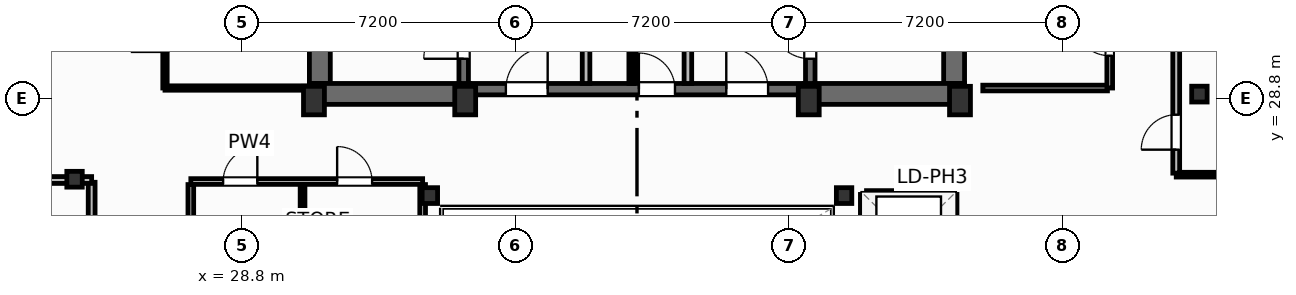
"""IFC4 building model, lengths in metres.
Left out: names, types, materials, properties, quantities, classifications, styles, units other than length and angle.
Written with IfcOpenShell. Run it as: python <this file> out.ifc"""

import sys

from ifc_helpers import new_model, si_unit, direction, frame, frame_2d, origin, origin_2d, place, context, subcontext, project, spatial, rectangle, i_section, extrude, element, fill, save


model = new_model("IFC4")
c1 = context("Model", 3, precision=1e-05, world=origin(), true_north=direction((0.0, 1.0)))
c2 = subcontext(c1, "Body", "Model", "MODEL_VIEW")
j1 = project(units=[si_unit("LENGTHUNIT", "METRE"), si_unit("PLANEANGLEUNIT", "RADIAN")], contexts=[c1])
p1 = place(None, origin())
s1 = spatial("IfcSite", under=j1, at=p1, CompositionType="ELEMENT")
p2 = place(p1, origin())
s2 = spatial("IfcBuilding", under=s1, at=p2, CompositionType="ELEMENT")
p3 = place(p2, frame((0.0, 0.0, 273.0)))
s3 = spatial("IfcBuildingStorey", under=s2, at=p3, CompositionType="ELEMENT", Elevation=273.0)
for number, where, z_axis, x_axis in (
    (1, (30.7, 28.75, 0.0), (0.0, 0.0, 1.0), (1.0, 0.0, 0.0)),
    (2, (34.68, 28.75, 0.0), (0.0, 0.0, 1.0), (1.0, 0.0, 0.0)),
    (3, (43.72, 28.75, 0.0), (0.0, 0.0, 1.0), (1.0, 0.0, 0.0)),
    (4, (47.7, 28.75, 0.0), (0.0, 0.0, 1.0), (1.0, 0.0, 0.0)),
):
    element("IfcColumn", number, at=place(p3, frame(where, z_axis=z_axis, x_axis=x_axis)), inside=s3, PredefinedType="COLUMN", context=c2, shape_type="SweptSolid", body=[
        extrude(rectangle(XDim=0.55, YDim=0.75, at=origin_2d()), origin(), (0.0, 0.0, 1.0), 3.7),
    ])
for number, where, z_axis, x_axis in (
    (5, (33.75, 26.25, 0.0), (0.0, 0.0, 1.0), (1.0, 0.0, 0.0)),
    (6, (44.65, 26.25, 0.0), (0.0, 0.0, 1.0), (1.0, 0.0, 0.0)),
    (7, (24.4, 26.68, 0.0), (0.0, 0.0, 1.0), (1.0, 0.0, 0.0)),
    (8, (54.0, 28.92, 0.0), (0.0, 0.0, 1.0), (1.0, 0.0, 0.0)),
):
    element("IfcColumn", number, at=place(p3, frame(where, z_axis=z_axis, x_axis=x_axis)), inside=s3, PredefinedType="COLUMN", context=c2, shape_type="SweptSolid", body=[
        extrude(i_section(OverallWidth=0.406, OverallDepth=0.416, WebThickness=0.03, FlangeThickness=0.048, FilletRadius=0.025, at=origin_2d()), origin(), (0.0, 0.0, 1.0), 3.7),
    ])
for number, where, z_axis, x_axis in (
    (9, (30.855, 29.2, 0.0), (0.0, 0.0, 1.0), (0.0, 1.0, 0.0)),
    (10, (47.545, 29.2, 0.0), (0.0, 0.0, 1.0), (0.0, 1.0, 0.0)),
):
    element("IfcWall", number, at=place(p3, frame(where, z_axis=z_axis, x_axis=x_axis)), inside=s3, PredefinedType="SHEAR", context=c2, shape_type="SweptSolid", body=[
        extrude(rectangle(XDim=9.22, YDim=0.55, at=frame_2d((4.61, 0.0))), origin(), (0.0, 0.0, 1.0), 3.45),
    ])
for number, where, z_axis, x_axis in (
    (11, (30.58, 28.925, 0.0), (0.0, 0.0, 1.0), (1.0, 0.0, 0.0)),
    (12, (43.6, 28.925, 0.0), (0.0, 0.0, 1.0), (1.0, 0.0, 0.0)),
):
    element("IfcWall", number, at=place(p3, frame(where, z_axis=z_axis, x_axis=x_axis)), inside=s3, PredefinedType="SHEAR", context=c2, shape_type="SweptSolid", body=[
        extrude(rectangle(XDim=4.22, YDim=0.55, at=frame_2d((2.11, 0.0))), origin(), (0.0, 0.0, 1.0), 3.45),
    ])
p4 = place(p3, frame((34.8, 29.05, 0.0), z_axis=(0.0, 0.0, 1.0), x_axis=(1.0, 0.0, 0.0)))
e13 = element("IfcWall", 13, at=p4, inside=s3, PredefinedType="SHEAR", context=c2, shape_type="SweptSolid", body=[
    extrude(rectangle(XDim=8.8, YDim=0.3, at=frame_2d((4.4, 0.0))), origin(), (0.0, 0.0, 1.0), 3.45),
])
p5 = place(p4, frame((0.95, 0.0, 0.0)))
e14 = element("IfcOpeningElement", 14, at=p5, cuts=e13, PredefinedType="OPENING", context=c2, shape_type="SweptSolid", body=[
    extrude(rectangle(XDim=1.1, YDim=2.15, at=frame_2d((0.55, 1.075))), frame((0.0, 0.16, 0.0), z_axis=(0.0, -1.0, 0.0), x_axis=(1.0, 0.0, 0.0)), (0.0, 0.0, 1.0), 0.32),
])
p6 = place(p4, frame((6.75, 0.0, 0.0)))
e15 = element("IfcOpeningElement", 15, at=p6, cuts=e13, PredefinedType="OPENING", context=c2, shape_type="SweptSolid", body=[
    extrude(rectangle(XDim=1.1, YDim=2.15, at=frame_2d((0.55, 1.075))), frame((0.0, 0.16, 0.0), z_axis=(0.0, -1.0, 0.0), x_axis=(1.0, 0.0, 0.0)), (0.0, 0.0, 1.0), 0.32),
])
p7 = place(p4, frame((4.45, 0.0, 0.0)))
e16 = element("IfcOpeningElement", 16, at=p7, cuts=e13, PredefinedType="OPENING", context=c2, shape_type="SweptSolid", body=[
    extrude(rectangle(XDim=0.95, YDim=2.15, at=frame_2d((0.475, 1.075))), frame((0.0, 0.16, 0.0), z_axis=(0.0, -1.0, 0.0), x_axis=(1.0, 0.0, 0.0)), (0.0, 0.0, 1.0), 0.32),
])
p8 = place(p3, frame((34.64, 29.2, 0.0), z_axis=(0.0, 0.0, 1.0), x_axis=(0.0, 1.0, 0.0)))
e17 = element("IfcWall", 17, at=p8, inside=s3, PredefinedType="SHEAR", context=c2, shape_type="SweptSolid", body=[
    extrude(rectangle(XDim=9.22, YDim=0.25, at=frame_2d((4.61, 0.0))), origin(), (0.0, 0.0, 1.0), 3.45),
])
p9 = place(p8, frame((0.65, 0.0, 0.0)))
e18 = element("IfcOpeningElement", 18, at=p9, cuts=e17, PredefinedType="OPENING", context=c2, shape_type="SweptSolid", body=[
    extrude(rectangle(XDim=1.05, YDim=2.15, at=frame_2d((0.525, 1.075))), frame((0.0, 0.135, 0.0), z_axis=(0.0, -1.0, 0.0), x_axis=(1.0, 0.0, 0.0)), (0.0, 0.0, 1.0), 0.27),
])
p10 = place(p3, frame((43.76, 29.2, 0.0), z_axis=(0.0, 0.0, 1.0), x_axis=(0.0, 1.0, 0.0)))
e19 = element("IfcWall", 19, at=p10, inside=s3, PredefinedType="SHEAR", context=c2, shape_type="SweptSolid", body=[
    extrude(rectangle(XDim=9.22, YDim=0.25, at=frame_2d((4.61, 0.0))), origin(), (0.0, 0.0, 1.0), 3.45),
])
p11 = place(p10, frame((0.65, 0.0, 0.0)))
e20 = element("IfcOpeningElement", 20, at=p11, cuts=e19, PredefinedType="OPENING", context=c2, shape_type="SweptSolid", body=[
    extrude(rectangle(XDim=1.05, YDim=2.15, at=frame_2d((0.525, 1.075))), frame((0.0, 0.135, 0.0), z_axis=(0.0, -1.0, 0.0), x_axis=(1.0, 0.0, 0.0)), (0.0, 0.0, 1.0), 0.27),
])
p12 = place(p3, frame((24.85, 23.03, 0.0), z_axis=(0.0, 0.0, 1.0), x_axis=(0.0, 1.0, 0.0)))
e21 = element("IfcWall", 21, at=p12, inside=s3, PredefinedType="PARTITIONING", context=c2, shape_type="SweptSolid", body=[
    extrude(rectangle(XDim=3.57, YDim=0.18, at=frame_2d((1.785, 0.0))), origin(), (0.0, 0.0, 1.0), 3.45),
])
p13 = place(p12, frame((1.5, 0.0, 0.0)))
e22 = element("IfcOpeningElement", 22, at=p13, cuts=e21, PredefinedType="OPENING", context=c2, shape_type="SweptSolid", body=[
    extrude(rectangle(XDim=0.92, YDim=2.05, at=frame_2d((0.46, 1.025))), frame((0.0, 0.1, 0.0), z_axis=(0.0, -1.0, 0.0), x_axis=(1.0, 0.0, 0.0)), (0.0, 0.0, 1.0), 0.2),
])
p14 = place(p3, frame((5.107, 26.66, 0.0), z_axis=(0.0, 0.0, 1.0), x_axis=(1.0, 0.0, 0.0)))
e23 = element("IfcWall", 23, at=p14, inside=s3, PredefinedType="PARTITIONING", context=c2, shape_type="SweptSolid", body=[
    extrude(rectangle(XDim=19.743, YDim=0.18, at=frame_2d((9.872, 0.0))), origin(), (0.0, 0.0, 1.0), 2.662),
])
p15 = place(p3, frame((53.39, 26.8, 0.0), z_axis=(0.0, 0.0, 1.0), x_axis=(1.0, 0.0, 0.0)))
e24 = element("IfcWall", 24, at=p15, inside=s3, PredefinedType="PARTITIONING", context=c2, shape_type="SweptSolid", body=[
    extrude(rectangle(XDim=22.348, YDim=0.125, at=frame_2d((11.174, 0.0))), origin(), (0.0, 0.0, 1.0), 3.45),
])
p16 = place(p3, frame((53.39, 26.84, 0.0), z_axis=(0.0, 0.0, 1.0), x_axis=(0.0, 1.0, 0.0)))
e25 = element("IfcWall", 25, at=p16, inside=s3, PredefinedType="PARTITIONING", context=c2, shape_type="SweptSolid", body=[
    extrude(rectangle(XDim=12.46, YDim=0.18, at=frame_2d((6.23, 0.0))), origin(), (0.0, 0.0, 1.0), 3.45),
])
p17 = place(p16, frame((0.618, 0.0, 0.0)))
e26 = element("IfcOpeningElement", 26, at=p17, cuts=e25, PredefinedType="OPENING", context=c2, shape_type="SweptSolid", body=[
    extrude(rectangle(XDim=0.92, YDim=2.05, at=frame_2d((0.46, 1.025))), frame((0.0, 0.1, 0.0), z_axis=(0.0, -1.0, 0.0), x_axis=(1.0, 0.0, 0.0)), (0.0, 0.0, 1.0), 0.2),
])
for number, where, z_axis, x_axis in (
    (27, (37.86, 29.2, 0.0), (0.0, 0.0, 1.0), (0.0, 1.0, 0.0)),
    (28, (40.54, 29.2, 0.0), (0.0, 0.0, 1.0), (0.0, 1.0, 0.0)),
):
    element("IfcWall", number, at=place(p3, frame(where, z_axis=z_axis, x_axis=x_axis)), inside=s3, PredefinedType="PARTITIONING", context=c2, shape_type="SweptSolid", body=[
        extrude(rectangle(XDim=5.18, YDim=0.2, at=frame_2d((2.59, 0.0))), origin(), (0.0, 0.0, 1.0), 3.45),
    ])
p18 = place(p3, frame((39.05, 29.2, 0.0), z_axis=(0.0, 0.0, 1.0), x_axis=(0.0, 1.0, 0.0)))
e29 = element("IfcWall", 29, at=p18, inside=s3, PredefinedType="PARTITIONING", context=c2, shape_type="SweptSolid", body=[
    extrude(rectangle(XDim=5.22, YDim=0.125, at=frame_2d((2.61, 0.0))), origin(), (0.0, 0.0, 1.0), 3.45),
])
p19 = place(p18, frame((2.05, 0.0, 0.0)))
e30 = element("IfcOpeningElement", 30, at=p19, cuts=e29, PredefinedType="OPENING", context=c2, shape_type="SweptSolid", body=[
    extrude(rectangle(XDim=0.85, YDim=2.05, at=frame_2d((0.425, 1.025))), frame((0.0, 0.073, 0.0), z_axis=(0.0, -1.0, 0.0), x_axis=(1.0, 0.0, 0.0)), (0.0, 0.0, 1.0), 0.145),
])
p20 = place(p3, frame((27.46, 26.62, 0.0), z_axis=(0.0, 0.0, 1.0), x_axis=(1.0, 0.0, 0.0)))
e31 = element("IfcWall", 31, at=p20, inside=s3, PredefinedType="PARTITIONING", context=c2, shape_type="SweptSolid", body=[
    extrude(rectangle(XDim=6.1, YDim=0.15, at=frame_2d((3.05, 0.0))), origin(), (0.0, 0.0, 1.0), 2.662),
])
p21 = place(p20, frame((0.85, 0.0, 0.0)))
e32 = element("IfcOpeningElement", 32, at=p21, cuts=e31, PredefinedType="OPENING", context=c2, shape_type="SweptSolid", body=[
    extrude(rectangle(XDim=0.9, YDim=2.05, at=frame_2d((0.45, 1.025))), frame((0.0, 0.085, 0.0), z_axis=(0.0, -1.0, 0.0), x_axis=(1.0, 0.0, 0.0)), (0.0, 0.0, 1.0), 0.17),
])
p22 = place(p20, frame((3.85, 0.0, 0.0)))
e33 = element("IfcOpeningElement", 33, at=p22, cuts=e31, PredefinedType="OPENING", context=c2, shape_type="SweptSolid", body=[
    extrude(rectangle(XDim=0.92, YDim=2.05, at=frame_2d((0.46, 1.025))), frame((0.0, 0.085, 0.0), z_axis=(0.0, -1.0, 0.0), x_axis=(1.0, 0.0, 0.0)), (0.0, 0.0, 1.0), 0.17),
])
p23 = place(p3, frame((30.4, 23.0, 0.0), z_axis=(0.0, 0.0, 1.0), x_axis=(0.0, 1.0, 0.0)))
e34 = element("IfcWall", 34, at=p23, inside=s3, PredefinedType="PARTITIONING", context=c2, shape_type="SweptSolid", body=[
    extrude(rectangle(XDim=3.54, YDim=0.125, at=frame_2d((1.77, 0.0))), origin(), (0.0, 0.0, 1.0), 3.45),
])
p24 = place(p3, frame((27.46, 19.38, 0.0), z_axis=(0.0, 0.0, 1.0), x_axis=(0.0, 1.0, 0.0)))
e35 = element("IfcWall", 35, at=p24, inside=s3, PredefinedType="PARTITIONING", context=c2, shape_type="SweptSolid", body=[
    extrude(rectangle(XDim=7.16, YDim=0.15, at=frame_2d((3.58, 0.0))), origin(), (0.0, 0.0, 1.0), 3.45),
])
p25 = place(p24, frame((1.1, 0.0, 0.0)))
e36 = element("IfcOpeningElement", 36, at=p25, cuts=e35, PredefinedType="OPENING", context=c2, shape_type="SweptSolid", body=[
    extrude(rectangle(XDim=0.95, YDim=2.05, at=frame_2d((0.475, 1.025))), frame((0.0, 0.085, 0.0), z_axis=(0.0, -1.0, 0.0), x_axis=(1.0, 0.0, 0.0)), (0.0, 0.0, 1.0), 0.17),
])
p26 = place(p3, frame((33.56, 19.38, 0.0), z_axis=(0.0, 0.0, 1.0), x_axis=(0.0, 1.0, 0.0)))
e37 = element("IfcWall", 37, at=p26, inside=s3, PredefinedType="PARTITIONING", context=c2, shape_type="SweptSolid", body=[
    extrude(rectangle(XDim=7.16, YDim=0.15, at=frame_2d((3.58, 0.0))), origin(), (0.0, 0.0, 1.0), 2.824),
])
p27 = place(p3, frame((26.78, 29.08, 0.0), z_axis=(0.0, 0.0, 1.0), x_axis=(1.0, 0.0, 0.0)))
e38 = element("IfcWall", 38, at=p27, inside=s3, PredefinedType="PARTITIONING", context=c2, shape_type="SweptSolid", body=[
    extrude(rectangle(XDim=3.8, YDim=0.115, at=frame_2d((1.9, 0.0))), origin(), (0.0, 0.0, 1.0), 3.45),
])
p28 = place(p3, frame((26.78, 29.08, 0.0), z_axis=(0.0, 0.0, 1.0), x_axis=(0.0, 1.0, 0.0)))
e39 = element("IfcWall", 39, at=p28, inside=s3, PredefinedType="PARTITIONING", context=c2, shape_type="SweptSolid", body=[
    extrude(rectangle(XDim=3.11, YDim=0.115, at=frame_2d((1.555, 0.0))), origin(), (0.0, 0.0, 1.0), 3.45),
])
p29 = place(p28, frame((0.95, 0.0, 0.0)))
e40 = element("IfcOpeningElement", 40, at=p29, cuts=e39, PredefinedType="OPENING", context=c2, shape_type="SweptSolid", body=[
    extrude(rectangle(XDim=0.9, YDim=2.05, at=frame_2d((0.45, 1.025))), frame((0.0, 0.067, 0.0), z_axis=(0.0, -1.0, 0.0), x_axis=(1.0, 0.0, 0.0)), (0.0, 0.0, 1.0), 0.135),
])
p30 = place(p3, frame((48.3, 29.08, 0.0), z_axis=(0.0, 0.0, 1.0), x_axis=(1.0, 0.0, 0.0)))
e41 = element("IfcWall", 41, at=p30, inside=s3, PredefinedType="PARTITIONING", context=c2, shape_type="SweptSolid", body=[
    extrude(rectangle(XDim=3.28, YDim=0.15, at=frame_2d((1.64, 0.0))), origin(), (0.0, 0.0, 1.0), 2.662),
])
p31 = place(p3, frame((51.64, 29.08, 0.0), z_axis=(0.0, 0.0, 1.0), x_axis=(0.0, 1.0, 0.0)))
e42 = element("IfcWall", 42, at=p31, inside=s3, PredefinedType="PARTITIONING", context=c2, shape_type="SweptSolid", body=[
    extrude(rectangle(XDim=6.88, YDim=0.15, at=frame_2d((3.44, 0.0))), origin(), (0.0, 0.0, 1.0), 3.45),
])
p32 = place(p31, frame((0.85, 0.0, 0.0)))
e43 = element("IfcOpeningElement", 43, at=p32, cuts=e42, PredefinedType="OPENING", context=c2, shape_type="SweptSolid", body=[
    extrude(rectangle(XDim=0.95, YDim=2.05, at=frame_2d((0.475, 1.025))), frame((0.0, 0.085, 0.0), z_axis=(0.0, -1.0, 0.0), x_axis=(1.0, 0.0, 0.0)), (0.0, 0.0, 1.0), 0.17),
])
p33 = place(p3, frame((45.24, 26.28, 0.0), z_axis=(0.0, 0.0, 1.0), x_axis=(1.0, 0.0, 0.0)))
e44 = element("IfcWall", 44, at=p33, inside=s3, PredefinedType="PARTITIONING", context=c2, shape_type="SweptSolid", body=[
    extrude(rectangle(XDim=2.22, YDim=0.2, at=frame_2d((1.11, 0.0))), origin(), (0.0, 0.0, 1.0), 3.45),
])
p34 = place(p3, frame((45.18, 19.38, 0.0), z_axis=(0.0, 0.0, 1.0), x_axis=(0.0, 1.0, 0.0)))
e45 = element("IfcWall", 45, at=p34, inside=s3, PredefinedType="PARTITIONING", context=c2, shape_type="SweptSolid", body=[
    extrude(rectangle(XDim=6.9, YDim=0.2, at=frame_2d((3.45, 0.0))), origin(), (0.0, 0.0, 1.0), 3.45),
])
p35 = place(p3, frame((47.52, 19.38, 0.0), z_axis=(0.0, 0.0, 1.0), x_axis=(0.0, 1.0, 0.0)))
e46 = element("IfcWall", 46, at=p35, inside=s3, PredefinedType="PARTITIONING", context=c2, shape_type="SweptSolid", body=[
    extrude(rectangle(XDim=6.9, YDim=0.2, at=frame_2d((3.45, 0.0))), origin(), (0.0, 0.0, 1.0), 3.45),
])
p36 = place(p35, frame((0.59, 0.0, 0.0)))
e47 = element("IfcOpeningElement", 47, at=p36, cuts=e46, PredefinedType="OPENING", context=c2, shape_type="SweptSolid", body=[
    extrude(rectangle(XDim=1.1, YDim=2.15, at=frame_2d((0.55, 1.075))), frame((0.0, 0.11, 0.0), z_axis=(0.0, -1.0, 0.0), x_axis=(1.0, 0.0, 0.0)), (0.0, 0.0, 1.0), 0.22),
])
p37 = place(p35, frame((2.89, 0.0, 0.0)))
e48 = element("IfcOpeningElement", 48, at=p37, cuts=e46, PredefinedType="OPENING", context=c2, shape_type="SweptSolid", body=[
    extrude(rectangle(XDim=1.1, YDim=2.15, at=frame_2d((0.55, 1.075))), frame((0.0, 0.11, 0.0), z_axis=(0.0, -1.0, 0.0), x_axis=(1.0, 0.0, 0.0)), (0.0, 0.0, 1.0), 0.22),
])
p38 = place(p35, frame((5.19, 0.0, 0.0)))
e49 = element("IfcOpeningElement", 49, at=p38, cuts=e46, PredefinedType="OPENING", context=c2, shape_type="SweptSolid", body=[
    extrude(rectangle(XDim=1.1, YDim=2.15, at=frame_2d((0.55, 1.075))), frame((0.0, 0.11, 0.0), z_axis=(0.0, -1.0, 0.0), x_axis=(1.0, 0.0, 0.0)), (0.0, 0.0, 1.0), 0.22),
])
p39 = place(p17, origin())
e50 = element("IfcDoor", 50, at=p39, inside=s3, OperationType="SINGLE_SWING_LEFT", PredefinedType="DOOR", context=c2, shape_type="SweptSolid", body=[
    extrude(rectangle(XDim=0.92, YDim=2.05, at=frame_2d((0.46, 1.025))), frame((0.0, 0.025, 0.0), z_axis=(0.0, -1.0, 0.0), x_axis=(1.0, 0.0, 0.0)), (0.0, 0.0, 1.0), 0.05),
])
fill(e26, e50)
p40 = place(p9, origin())
e51 = element("IfcDoor", 51, at=p40, inside=s3, OperationType="SINGLE_SWING_LEFT", PredefinedType="DOOR", context=c2, shape_type="SweptSolid", body=[
    extrude(rectangle(XDim=1.05, YDim=2.15, at=frame_2d((0.525, 1.075))), frame((0.0, 0.025, 0.0), z_axis=(0.0, -1.0, 0.0), x_axis=(1.0, 0.0, 0.0)), (0.0, 0.0, 1.0), 0.05),
])
fill(e18, e51)
p41 = place(p11, origin())
e52 = element("IfcDoor", 52, at=p41, inside=s3, OperationType="SINGLE_SWING_RIGHT", PredefinedType="DOOR", context=c2, shape_type="SweptSolid", body=[
    extrude(rectangle(XDim=1.05, YDim=2.15, at=frame_2d((0.525, 1.075))), frame((0.0, 0.025, 0.0), z_axis=(0.0, -1.0, 0.0), x_axis=(1.0, 0.0, 0.0)), (0.0, 0.0, 1.0), 0.05),
])
fill(e20, e52)
p42 = place(p5, origin())
e53 = element("IfcDoor", 53, at=p42, inside=s3, OperationType="SINGLE_SWING_RIGHT", PredefinedType="DOOR", context=c2, shape_type="SweptSolid", body=[
    extrude(rectangle(XDim=1.1, YDim=2.15, at=frame_2d((0.55, 1.075))), frame((0.0, 0.025, 0.0), z_axis=(0.0, -1.0, 0.0), x_axis=(1.0, 0.0, 0.0)), (0.0, 0.0, 1.0), 0.05),
])
fill(e14, e53)
p43 = place(p6, origin())
e54 = element("IfcDoor", 54, at=p43, inside=s3, OperationType="SINGLE_SWING_LEFT", PredefinedType="DOOR", context=c2, shape_type="SweptSolid", body=[
    extrude(rectangle(XDim=1.1, YDim=2.15, at=frame_2d((0.55, 1.075))), frame((0.0, 0.025, 0.0), z_axis=(0.0, -1.0, 0.0), x_axis=(1.0, 0.0, 0.0)), (0.0, 0.0, 1.0), 0.05),
])
fill(e15, e54)
p44 = place(p7, origin())
e55 = element("IfcDoor", 55, at=p44, inside=s3, OperationType="SINGLE_SWING_LEFT", PredefinedType="DOOR", context=c2, shape_type="SweptSolid", body=[
    extrude(rectangle(XDim=0.95, YDim=2.15, at=frame_2d((0.475, 1.075))), frame((0.0, 0.025, 0.0), z_axis=(0.0, -1.0, 0.0), x_axis=(1.0, 0.0, 0.0)), (0.0, 0.0, 1.0), 0.05),
])
fill(e16, e55)
p45 = place(p21, origin())
e56 = element("IfcDoor", 56, at=p45, inside=s3, OperationType="SINGLE_SWING_RIGHT", PredefinedType="DOOR", context=c2, shape_type="SweptSolid", body=[
    extrude(rectangle(XDim=0.9, YDim=2.05, at=frame_2d((0.45, 1.025))), frame((0.0, 0.025, 0.0), z_axis=(0.0, -1.0, 0.0), x_axis=(1.0, 0.0, 0.0)), (0.0, 0.0, 1.0), 0.05),
])
fill(e32, e56)
p46 = place(p22, origin())
e57 = element("IfcDoor", 57, at=p46, inside=s3, OperationType="SINGLE_SWING_LEFT", PredefinedType="DOOR", context=c2, shape_type="SweptSolid", body=[
    extrude(rectangle(XDim=0.92, YDim=2.05, at=frame_2d((0.46, 1.025))), frame((0.0, 0.025, 0.0), z_axis=(0.0, -1.0, 0.0), x_axis=(1.0, 0.0, 0.0)), (0.0, 0.0, 1.0), 0.05),
])
fill(e33, e57)
p47 = place(p32, origin())
e58 = element("IfcDoor", 58, at=p47, inside=s3, OperationType="SINGLE_SWING_RIGHT", PredefinedType="DOOR", context=c2, shape_type="SweptSolid", body=[
    extrude(rectangle(XDim=0.95, YDim=2.05, at=frame_2d((0.475, 1.025))), frame((0.0, 0.025, 0.0), z_axis=(0.0, -1.0, 0.0), x_axis=(1.0, 0.0, 0.0)), (0.0, 0.0, 1.0), 0.05),
])
fill(e43, e58)
save(model, sys.argv[1])
